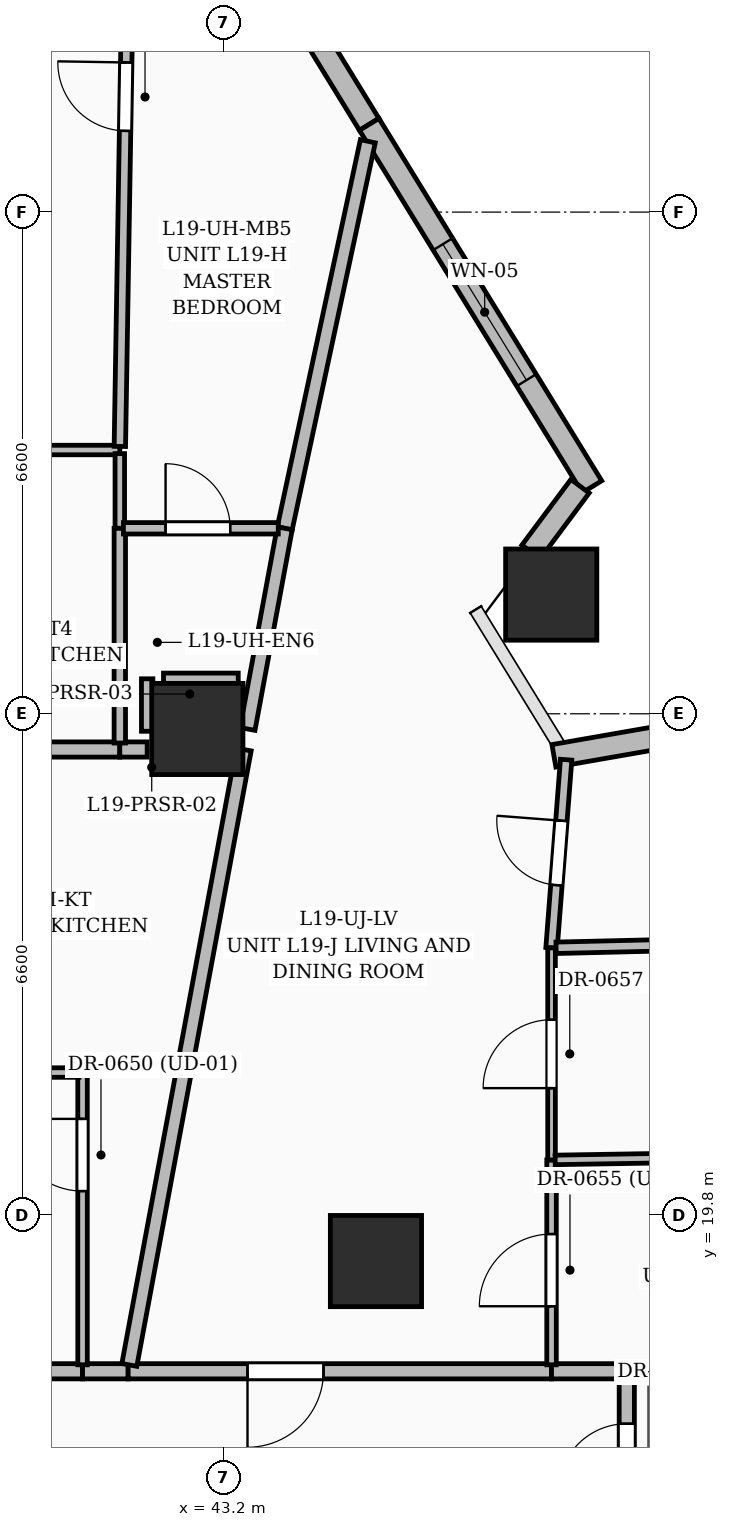
"""IFC4 building model, lengths in metres.
Left out: names, types, materials, properties, quantities, classifications, styles, units other than length and angle.
Written with IfcOpenShell. Run it as: python <this file> out.ifc"""

import sys

from ifc_helpers import new_model, si_unit, direction, frame, frame_2d, origin, origin_2d, place, context, subcontext, project, spatial, rectangle, extrude, element, fill, save


model = new_model("IFC4")
c1 = context("Model", 3, precision=1e-05, world=origin(), true_north=direction((0.0, 1.0)))
c2 = subcontext(c1, "Body", "Model", "MODEL_VIEW")
j1 = project(units=[si_unit("LENGTHUNIT", "METRE"), si_unit("PLANEANGLEUNIT", "RADIAN")], contexts=[c1])
p1 = place(None, origin())
s1 = spatial("IfcSite", under=j1, at=p1, CompositionType="ELEMENT")
p2 = place(p1, origin())
s2 = spatial("IfcBuilding", under=s1, at=p2, CompositionType="ELEMENT")
p3 = place(p2, frame((0.0, 0.0, 78.6)))
s3 = spatial("IfcBuildingStorey", under=s2, at=p3, CompositionType="ELEMENT", Elevation=78.6)
for number, where, z_axis, x_axis in (
    (1, (45.2, 19.2, 0.0), (0.0, 0.0, 1.0), (1.0, 0.0, 0.0)),
    (2, (42.85, 26.2, 0.0), (0.0, 0.0, 1.0), (1.0, 0.0, 0.0)),
    (3, (47.506, 27.968, 0.0), (0.0, 0.0, 1.0), (1.0, 0.0, 0.0)),
):
    element("IfcColumn", number, at=place(p3, frame(where, z_axis=z_axis, x_axis=x_axis)), inside=s3, PredefinedType="COLUMN", context=c2, shape_type="SweptSolid", body=[
        extrude(rectangle(XDim=1.2, YDim=1.2, at=origin_2d()), origin(), (0.0, 0.0, 1.0), 3.6),
    ])
p4 = place(p3, frame((42.153, 38.967, 0.0), z_axis=(0.0, 0.0, 1.0), x_axis=(0.523687465278, -0.851910464022, 0.0)))
e4 = element("IfcWall", 4, at=p4, inside=s3, PredefinedType="SOLIDWALL", context=c2, shape_type="SweptSolid", body=[
    extrude(rectangle(XDim=5.649, YDim=0.3, at=frame_2d((2.825, 0.0))), origin(), (0.0, 0.0, 1.0), 3.35),
])
p5 = place(p4, frame((1.628, 0.0, 0.6)))
e5 = element("IfcOpeningElement", 5, at=p5, cuts=e4, PredefinedType="OPENING", context=c2, shape_type="SweptSolid", body=[
    extrude(rectangle(XDim=2.4, YDim=2.1, at=frame_2d((1.2, 1.05))), frame((0.0, 0.16, 0.0), z_axis=(0.0, -1.0, 0.0), x_axis=(1.0, 0.0, 0.0)), (0.0, 0.0, 1.0), 0.32),
])
p6 = place(p3, frame((45.111, 34.154, 0.0), z_axis=(0.0, 0.0, 1.0), x_axis=(0.523710369238, -0.851896384047, 0.0)))
e6 = element("IfcWall", 6, at=p6, inside=s3, PredefinedType="SOLIDWALL", context=c2, shape_type="SweptSolid", body=[
    extrude(rectangle(XDim=5.596, YDim=0.3, at=frame_2d((2.798, 0.0))), origin(), (0.0, 0.0, 1.0), 3.35),
])
p7 = place(p6, frame((1.85, 0.0, 0.55)))
e7 = element("IfcOpeningElement", 7, at=p7, cuts=e6, PredefinedType="OPENING", context=c2, shape_type="SweptSolid", body=[
    extrude(rectangle(XDim=2.1, YDim=2.4, at=frame_2d((1.05, 1.2))), frame((0.0, 0.16, 0.0), z_axis=(0.0, -1.0, 0.0), x_axis=(1.0, 0.0, 0.0)), (0.0, 0.0, 1.0), 0.32),
])
p8 = place(p3, frame((47.885, 29.394, 0.0), z_axis=(0.0, 0.0, 1.0), x_axis=(-0.598186461049, -0.801356947819, 0.0)))
e8 = element("IfcWall", 8, at=p8, inside=s3, PredefinedType="SOLIDWALL", context=c2, shape_type="SweptSolid", body=[
    extrude(rectangle(XDim=1.078, YDim=0.3, at=frame_2d((0.539, 0.0))), origin(), (0.0, 0.0, 1.0), 2.375),
])
p9 = place(p3, frame((47.541, 25.847, 0.0), z_axis=(0.0, 0.0, 1.0), x_axis=(0.985095505459, 0.172008270511, 0.0)))
e9 = element("IfcWall", 9, at=p9, inside=s3, PredefinedType="SOLIDWALL", context=c2, shape_type="SweptSolid", body=[
    extrude(rectangle(XDim=2.594, YDim=0.3, at=frame_2d((1.297, 0.0))), origin(), (0.0, 0.0, 1.0), 2.375),
])
p10 = place(p3, frame((48.5, 15.47, 0.0), z_axis=(0.0, 0.0, 1.0), x_axis=(0.0, 1.0, 0.0)))
e10 = element("IfcWall", 10, at=p10, inside=s3, PredefinedType="PARTITIONING", context=c2, shape_type="SweptSolid", body=[
    extrude(rectangle(XDim=2.28, YDim=0.2, at=frame_2d((1.14, 0.0))), origin(), (0.0, 0.0, 1.0), 2.345),
])
p11 = place(p10, frame((0.69, 0.0, 0.0)))
e11 = element("IfcOpeningElement", 11, at=p11, cuts=e10, PredefinedType="OPENING", context=c2, shape_type="SweptSolid", body=[
    extrude(rectangle(XDim=0.9, YDim=2.1, at=frame_2d((0.45, 1.05))), frame((0.0, 0.11, 0.0), z_axis=(0.0, -1.0, 0.0), x_axis=(1.0, 0.0, 0.0)), (0.0, 0.0, 1.0), 0.22),
])
p12 = place(p3, frame((41.34, 17.75, 0.0), z_axis=(0.0, 0.0, 1.0), x_axis=(-1.0, 0.0, 0.0)))
e12 = element("IfcWall", 12, at=p12, inside=s3, PredefinedType="PARTITIONING", context=c2, shape_type="SweptSolid", body=[
    extrude(rectangle(XDim=6.47, YDim=0.2, at=frame_2d((3.235, 0.0))), origin(), (0.0, 0.0, 1.0), 3.35),
])
p13 = place(p12, frame((2.735, 0.0, 0.0)))
e13 = element("IfcOpeningElement", 13, at=p13, cuts=e12, PredefinedType="OPENING", context=c2, shape_type="SweptSolid", body=[
    extrude(rectangle(XDim=1.0, YDim=2.2, at=frame_2d((0.5, 1.1))), frame((0.0, 0.11, 0.0), z_axis=(0.0, -1.0, 0.0), x_axis=(1.0, 0.0, 0.0)), (0.0, 0.0, 1.0), 0.22),
])
p14 = place(p3, frame((41.94, 17.75, 0.0), z_axis=(0.0, 0.0, 1.0), x_axis=(-1.0, 0.0, 0.0)))
e14 = element("IfcWall", 14, at=p14, inside=s3, PredefinedType="PARTITIONING", context=c2, shape_type="SweptSolid", body=[
    extrude(rectangle(XDim=0.6, YDim=0.2, at=frame_2d((0.3, 0.0))), origin(), (0.0, 0.0, 1.0), 3.35),
])
p15 = place(p3, frame((47.51, 17.75, 0.0), z_axis=(0.0, 0.0, 1.0), x_axis=(-1.0, 0.0, 0.0)))
e15 = element("IfcWall", 15, at=p15, inside=s3, PredefinedType="PARTITIONING", context=c2, shape_type="SweptSolid", body=[
    extrude(rectangle(XDim=5.57, YDim=0.2, at=frame_2d((2.785, 0.0))), origin(), (0.0, 0.0, 1.0), 2.309),
])
p16 = place(p15, frame((3.0, 0.0, 0.0)))
e16 = element("IfcOpeningElement", 16, at=p16, cuts=e15, PredefinedType="OPENING", context=c2, shape_type="SweptSolid", body=[
    extrude(rectangle(XDim=1.0, YDim=2.2, at=frame_2d((0.5, 1.1))), frame((0.0, 0.11, 0.0), z_axis=(0.0, -1.0, 0.0), x_axis=(1.0, 0.0, 0.0)), (0.0, 0.0, 1.0), 0.22),
])
p17 = place(p3, frame((48.415, 17.75, 0.0), z_axis=(0.0, 0.0, 1.0), x_axis=(-1.0, 0.0, 0.0)))
e17 = element("IfcWall", 17, at=p17, inside=s3, PredefinedType="PARTITIONING", context=c2, shape_type="SweptSolid", body=[
    extrude(rectangle(XDim=0.905, YDim=0.2, at=frame_2d((0.453, 0.0))), origin(), (0.0, 0.0, 1.0), 3.01),
])
p18 = place(p3, frame((54.983, 17.844, 0.0), z_axis=(0.0, 0.0, 1.0), x_axis=(-0.999894330503, -0.014537118977, 0.0)))
e18 = element("IfcWall", 18, at=p18, inside=s3, PredefinedType="PARTITIONING", context=c2, shape_type="SweptSolid", body=[
    extrude(rectangle(XDim=6.399, YDim=0.2, at=frame_2d((3.199, 0.0))), origin(), (0.0, 0.0, 1.0), 2.345),
])
p19 = place(p3, frame((41.34, 17.835, 0.0), z_axis=(0.0, 0.0, 1.0), x_axis=(0.0, 1.0, 0.0)))
e19 = element("IfcWall", 19, at=p19, inside=s3, PredefinedType="PARTITIONING", context=c2, shape_type="SweptSolid", body=[
    extrude(rectangle(XDim=3.845, YDim=0.125, at=frame_2d((1.922, 0.0))), origin(), (0.0, 0.0, 1.0), 3.35),
])
p20 = place(p19, frame((2.285, 0.0, 0.0)))
e20 = element("IfcOpeningElement", 20, at=p20, cuts=e19, PredefinedType="OPENING", context=c2, shape_type="SweptSolid", body=[
    extrude(rectangle(XDim=0.95, YDim=2.2, at=frame_2d((0.475, 1.1))), frame((0.0, 0.072, 0.0), z_axis=(0.0, -1.0, 0.0), x_axis=(1.0, 0.0, 0.0)), (0.0, 0.0, 1.0), 0.145),
])
p21 = place(p3, frame((41.292, 21.68, 0.0), z_axis=(0.0, 0.0, 1.0), x_axis=(-1.0, 0.0, 0.0)))
e21 = element("IfcWall", 21, at=p21, inside=s3, PredefinedType="PARTITIONING", context=c2, shape_type="SweptSolid", body=[
    extrude(rectangle(XDim=2.742, YDim=0.125, at=frame_2d((1.371, 0.0))), origin(), (0.0, 0.0, 1.0), 3.35),
])
p22 = place(p3, frame((41.956, 17.833, 0.0), z_axis=(0.0, 0.0, 1.0), x_axis=(0.182682671213, 0.98317192883, 0.0)))
e22 = element("IfcWall", 22, at=p22, inside=s3, PredefinedType="PARTITIONING", context=c2, shape_type="SweptSolid", body=[
    extrude(rectangle(XDim=8.235, YDim=0.2, at=frame_2d((4.118, 0.0))), origin(), (0.0, 0.0, 1.0), 2.309),
])
p23 = place(p3, frame((41.83, 25.93, 0.0), z_axis=(0.0, 0.0, 1.0), x_axis=(-1.0, 0.0, 0.0)))
e23 = element("IfcWall", 23, at=p23, inside=s3, PredefinedType="PARTITIONING", context=c2, shape_type="SweptSolid", body=[
    extrude(rectangle(XDim=3.233, YDim=0.2, at=frame_2d((1.616, 0.0))), origin(), (0.0, 0.0, 1.0), 2.309),
])
p24 = place(p3, frame((42.19, 25.93, 0.0), z_axis=(0.0, 0.0, 1.0), x_axis=(-1.0, 0.0, 0.0)))
e24 = element("IfcWall", 24, at=p24, inside=s3, PredefinedType="PARTITIONING", context=c2, shape_type="SweptSolid", body=[
    extrude(rectangle(XDim=0.36, YDim=0.2, at=frame_2d((0.18, 0.0))), origin(), (0.0, 0.0, 1.0), 2.309),
])
p25 = place(p3, frame((47.51, 23.32, 0.0), z_axis=(0.0, 0.0, 1.0), x_axis=(0.077275386284, 0.997009786649, 0.0)))
e25 = element("IfcWall", 25, at=p25, inside=s3, PredefinedType="PARTITIONING", context=c2, shape_type="SweptSolid", body=[
    extrude(rectangle(XDim=2.483, YDim=0.15, at=frame_2d((1.242, 0.0))), origin(), (0.0, 0.0, 1.0), 3.35),
])
p26 = place(p25, frame((0.828, 0.0, 0.0)))
e26 = element("IfcOpeningElement", 26, at=p26, cuts=e25, PredefinedType="OPENING", context=c2, shape_type="SweptSolid", body=[
    extrude(rectangle(XDim=0.85, YDim=2.1, at=frame_2d((0.425, 1.05))), frame((0.0, 0.085, 0.0), z_axis=(0.0, -1.0, 0.0), x_axis=(1.0, 0.0, 0.0)), (0.0, 0.0, 1.0), 0.17),
])
p27 = place(p3, frame((47.51, 17.835, 0.0), z_axis=(0.0, 0.0, 1.0), x_axis=(0.0, 1.0, 0.0)))
e27 = element("IfcWall", 27, at=p27, inside=s3, PredefinedType="PARTITIONING", context=c2, shape_type="SweptSolid", body=[
    extrude(rectangle(XDim=2.695, YDim=0.125, at=frame_2d((1.348, 0.0))), origin(), (0.0, 0.0, 1.0), 3.01),
])
p28 = place(p27, frame((0.771, 0.0, 0.0)))
e28 = element("IfcOpeningElement", 28, at=p28, cuts=e27, PredefinedType="OPENING", context=c2, shape_type="SweptSolid", body=[
    extrude(rectangle(XDim=0.95, YDim=2.2, at=frame_2d((0.475, 1.1))), frame((0.0, 0.072, 0.0), z_axis=(0.0, -1.0, 0.0), x_axis=(1.0, 0.0, 0.0)), (0.0, 0.0, 1.0), 0.145),
])
p29 = place(p3, frame((47.51, 20.53, 0.0), z_axis=(0.0, 0.0, 1.0), x_axis=(0.0, 1.0, 0.0)))
e29 = element("IfcWall", 29, at=p29, inside=s3, PredefinedType="PARTITIONING", context=c2, shape_type="SweptSolid", body=[
    extrude(rectangle(XDim=2.79, YDim=0.1, at=frame_2d((1.395, 0.0))), origin(), (0.0, 0.0, 1.0), 3.01),
])
p30 = place(p29, frame((0.945, 0.0, 0.0)))
e30 = element("IfcOpeningElement", 30, at=p30, cuts=e29, PredefinedType="OPENING", context=c2, shape_type="SweptSolid", body=[
    extrude(rectangle(XDim=0.9, YDim=2.15, at=frame_2d((0.45, 1.075))), frame((0.0, 0.06, 0.0), z_axis=(0.0, -1.0, 0.0), x_axis=(1.0, 0.0, 0.0)), (0.0, 0.0, 1.0), 0.12),
])
p31 = place(p3, frame((45.093, 33.932, 0.0), z_axis=(0.0, 0.0, 1.0), x_axis=(-0.209881245986, -0.977726885476, 0.0)))
e31 = element("IfcWall", 31, at=p31, inside=s3, PredefinedType="PARTITIONING", context=c2, shape_type="SweptSolid", body=[
    extrude(rectangle(XDim=5.208, YDim=0.2, at=frame_2d((2.604, 0.0))), origin(), (0.0, 0.0, 1.0), 2.37),
])
p32 = place(p3, frame((44.0, 28.84, 0.0), z_axis=(0.0, 0.0, 1.0), x_axis=(-0.18247668152, -0.983210181345, 0.0)))
e32 = element("IfcWall", 32, at=p32, inside=s3, PredefinedType="PARTITIONING", context=c2, shape_type="SweptSolid", body=[
    extrude(rectangle(XDim=2.685, YDim=0.2, at=frame_2d((1.343, 0.0))), origin(), (0.0, 0.0, 1.0), 3.01),
])
p33 = place(p3, frame((47.57, 23.321, 0.0), z_axis=(0.0, 0.0, 1.0), x_axis=(0.999720663017, 0.023634634246, 0.0)))
e33 = element("IfcWall", 33, at=p33, inside=s3, PredefinedType="PARTITIONING", context=c2, shape_type="SweptSolid", body=[
    extrude(rectangle(XDim=4.008, YDim=0.15, at=frame_2d((2.004, 0.0))), origin(), (0.0, 0.0, 1.0), 2.37),
])
p34 = place(p3, frame((53.298, 20.625, 0.0), z_axis=(0.0, 0.0, 1.0), x_axis=(-0.9998645785, -0.016456751239, 0.0)))
e34 = element("IfcWall", 34, at=p34, inside=s3, PredefinedType="PARTITIONING", context=c2, shape_type="SweptSolid", body=[
    extrude(rectangle(XDim=5.741, YDim=0.125, at=frame_2d((2.871, 0.0))), origin(), (0.0, 0.0, 1.0), 3.01),
])
p35 = place(p3, frame((37.655, 29.87, 0.0), z_axis=(0.0, 0.0, 1.0), x_axis=(1.0, 0.0, 0.0)))
e35 = element("IfcWall", 35, at=p35, inside=s3, PredefinedType="PARTITIONING", context=c2, shape_type="SweptSolid", body=[
    extrude(rectangle(XDim=4.175, YDim=0.125, at=frame_2d((2.087, 0.0))), origin(), (0.0, 0.0, 1.0), 3.35),
])
p36 = place(p35, frame((1.57, 0.0, 0.0)))
e36 = element("IfcOpeningElement", 36, at=p36, cuts=e35, PredefinedType="OPENING", context=c2, shape_type="SweptSolid", body=[
    extrude(rectangle(XDim=0.95, YDim=2.2, at=frame_2d((0.475, 1.1))), frame((0.0, 0.072, 0.0), z_axis=(0.0, -1.0, 0.0), x_axis=(1.0, 0.0, 0.0)), (0.0, 0.0, 1.0), 0.145),
])
p37 = place(p3, frame((41.831, 29.917, 0.0), z_axis=(0.0, 0.0, 1.0), x_axis=(0.016599696118, 0.999862215552, 0.0)))
e37 = element("IfcWall", 37, at=p37, inside=s3, PredefinedType="PARTITIONING", context=c2, shape_type="SweptSolid", body=[
    extrude(rectangle(XDim=9.06, YDim=0.15, at=frame_2d((4.53, 0.0))), origin(), (0.0, 0.0, 1.0), 2.345),
])
p38 = place(p37, frame((4.152, 0.0, 0.0)))
e38 = element("IfcOpeningElement", 38, at=p38, cuts=e37, PredefinedType="OPENING", context=c2, shape_type="SweptSolid", body=[
    extrude(rectangle(XDim=0.9, YDim=2.15, at=frame_2d((0.45, 1.075))), frame((0.0, 0.085, 0.0), z_axis=(0.0, -1.0, 0.0), x_axis=(1.0, 0.0, 0.0)), (0.0, 0.0, 1.0), 0.17),
])
p39 = place(p3, frame((41.83, 28.84, 0.0), z_axis=(0.0, 0.0, 1.0), x_axis=(0.0, 1.0, 0.0)))
e39 = element("IfcWall", 39, at=p39, inside=s3, PredefinedType="PARTITIONING", context=c2, shape_type="SweptSolid", body=[
    extrude(rectangle(XDim=0.982, YDim=0.125, at=frame_2d((0.491, 0.0))), origin(), (0.0, 0.0, 1.0), 3.01),
])
p40 = place(p3, frame((41.83, 26.015, 0.0), z_axis=(0.0, 0.0, 1.0), x_axis=(0.0, 1.0, 0.0)))
e40 = element("IfcWall", 40, at=p40, inside=s3, PredefinedType="PARTITIONING", context=c2, shape_type="SweptSolid", body=[
    extrude(rectangle(XDim=2.825, YDim=0.15, at=frame_2d((1.413, 0.0))), origin(), (0.0, 0.0, 1.0), 2.309),
])
p41 = place(p3, frame((41.877, 28.84, 0.0), z_axis=(0.0, 0.0, 1.0), x_axis=(1.0, 0.0, 0.0)))
e41 = element("IfcWall", 41, at=p41, inside=s3, PredefinedType="PARTITIONING", context=c2, shape_type="SweptSolid", body=[
    extrude(rectangle(XDim=2.038, YDim=0.15, at=frame_2d((1.019, 0.0))), origin(), (0.0, 0.0, 1.0), 2.345),
])
p42 = place(p41, frame((0.555, 0.0, 0.0)))
e42 = element("IfcOpeningElement", 42, at=p42, cuts=e41, PredefinedType="OPENING", context=c2, shape_type="SweptSolid", body=[
    extrude(rectangle(XDim=0.85, YDim=2.1, at=frame_2d((0.425, 1.05))), frame((0.0, 0.085, 0.0), z_axis=(0.0, -1.0, 0.0), x_axis=(1.0, 0.0, 0.0)), (0.0, 0.0, 1.0), 0.17),
])
p43 = place(p3, frame((42.19, 26.17, 0.0), z_axis=(0.0, 0.0, 1.0), x_axis=(0.0, 1.0, 0.0)))
e43 = element("IfcWall", 43, at=p43, inside=s3, PredefinedType="PARTITIONING", context=c2, shape_type="SweptSolid", body=[
    extrude(rectangle(XDim=0.69, YDim=0.15, at=frame_2d((0.345, 0.0))), origin(), (0.0, 0.0, 1.0), 2.309),
])
p44 = place(p3, frame((42.405, 26.86, 0.0), z_axis=(0.0, 0.0, 1.0), x_axis=(1.0, 0.0, 0.0)))
e44 = element("IfcWall", 44, at=p44, inside=s3, PredefinedType="PARTITIONING", context=c2, shape_type="SweptSolid", body=[
    extrude(rectangle(XDim=0.983, YDim=0.15, at=frame_2d((0.491, 0.0))), origin(), (0.0, 0.0, 1.0), 2.345),
])
p45 = place(p7, origin())
e45 = element("IfcWindow", 45, at=p45, inside=s3, PartitioningType="SINGLE_PANEL", PredefinedType="WINDOW", context=c2, shape_type="SweptSolid", body=[
    extrude(rectangle(XDim=2.1, YDim=2.4, at=frame_2d((1.05, 1.2))), frame((0.0, 0.03, 0.0), z_axis=(0.0, -1.0, 0.0), x_axis=(1.0, 0.0, 0.0)), (0.0, 0.0, 1.0), 0.06),
])
fill(e7, e45)
p46 = place(p11, origin())
e46 = element("IfcDoor", 46, at=p46, inside=s3, OperationType="SINGLE_SWING_LEFT", PredefinedType="DOOR", context=c2, shape_type="SweptSolid", body=[
    extrude(rectangle(XDim=0.9, YDim=2.1, at=frame_2d((0.45, 1.05))), frame((0.0, 0.025, 0.0), z_axis=(0.0, -1.0, 0.0), x_axis=(1.0, 0.0, 0.0)), (0.0, 0.0, 1.0), 0.05),
])
fill(e11, e46)
p47 = place(p20, origin())
e47 = element("IfcDoor", 47, at=p47, inside=s3, OperationType="SINGLE_SWING_RIGHT", PredefinedType="DOOR", context=c2, shape_type="SweptSolid", body=[
    extrude(rectangle(XDim=0.95, YDim=2.2, at=frame_2d((0.475, 1.1))), frame((0.0, 0.025, 0.0), z_axis=(0.0, -1.0, 0.0), x_axis=(1.0, 0.0, 0.0)), (0.0, 0.0, 1.0), 0.05),
])
fill(e20, e47)
p48 = place(p16, origin())
e48 = element("IfcDoor", 48, at=p48, inside=s3, OperationType="SINGLE_SWING_RIGHT", PredefinedType="DOOR", context=c2, shape_type="SweptSolid", body=[
    extrude(rectangle(XDim=1.0, YDim=2.2, at=frame_2d((0.5, 1.1))), frame((0.0, 0.025, 0.0), z_axis=(0.0, -1.0, 0.0), x_axis=(1.0, 0.0, 0.0)), (0.0, 0.0, 1.0), 0.05),
])
fill(e16, e48)
p49 = place(p28, origin())
e49 = element("IfcDoor", 49, at=p49, inside=s3, OperationType="SINGLE_SWING_LEFT", PredefinedType="DOOR", context=c2, shape_type="SweptSolid", body=[
    extrude(rectangle(XDim=0.95, YDim=2.2, at=frame_2d((0.475, 1.1))), frame((0.0, 0.025, 0.0), z_axis=(0.0, -1.0, 0.0), x_axis=(1.0, 0.0, 0.0)), (0.0, 0.0, 1.0), 0.05),
])
fill(e28, e49)
p50 = place(p26, origin())
e50 = element("IfcDoor", 50, at=p50, inside=s3, OperationType="SINGLE_SWING_RIGHT", PredefinedType="DOOR", context=c2, shape_type="SweptSolid", body=[
    extrude(rectangle(XDim=0.85, YDim=2.1, at=frame_2d((0.425, 1.05))), frame((0.0, 0.025, 0.0), z_axis=(0.0, -1.0, 0.0), x_axis=(1.0, 0.0, 0.0)), (0.0, 0.0, 1.0), 0.05),
])
fill(e26, e50)
p51 = place(p30, origin())
e51 = element("IfcDoor", 51, at=p51, inside=s3, OperationType="SINGLE_SWING_LEFT", PredefinedType="DOOR", context=c2, shape_type="SweptSolid", body=[
    extrude(rectangle(XDim=0.9, YDim=2.15, at=frame_2d((0.45, 1.075))), frame((0.0, 0.025, 0.0), z_axis=(0.0, -1.0, 0.0), x_axis=(1.0, 0.0, 0.0)), (0.0, 0.0, 1.0), 0.05),
])
fill(e30, e51)
p52 = place(p38, origin())
e52 = element("IfcDoor", 52, at=p52, inside=s3, OperationType="SINGLE_SWING_RIGHT", PredefinedType="DOOR", context=c2, shape_type="SweptSolid", body=[
    extrude(rectangle(XDim=0.9, YDim=2.15, at=frame_2d((0.45, 1.075))), frame((0.0, 0.025, 0.0), z_axis=(0.0, -1.0, 0.0), x_axis=(1.0, 0.0, 0.0)), (0.0, 0.0, 1.0), 0.05),
])
fill(e38, e52)
p53 = place(p42, origin())
e53 = element("IfcDoor", 53, at=p53, inside=s3, OperationType="SINGLE_SWING_LEFT", PredefinedType="DOOR", context=c2, shape_type="SweptSolid", body=[
    extrude(rectangle(XDim=0.85, YDim=2.1, at=frame_2d((0.425, 1.05))), frame((0.0, 0.025, 0.0), z_axis=(0.0, -1.0, 0.0), x_axis=(1.0, 0.0, 0.0)), (0.0, 0.0, 1.0), 0.05),
])
fill(e42, e53)
save(model, sys.argv[1])
